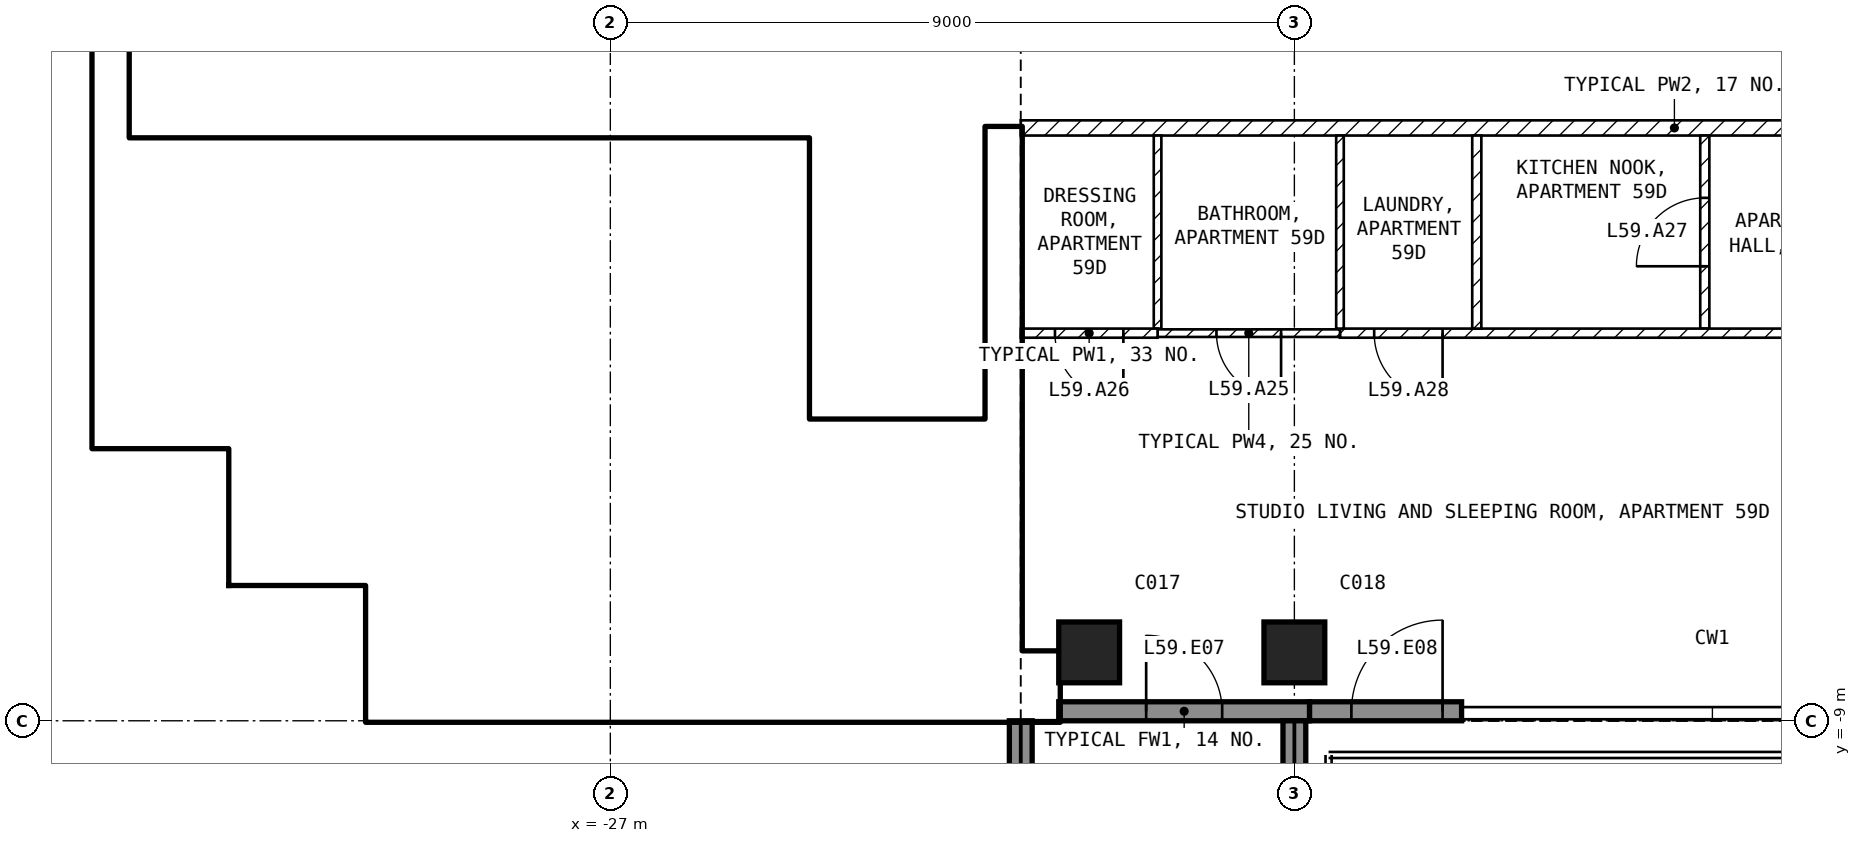
"""IFC4 building model, lengths in metres.
Left out: names, types, materials, properties, quantities, classifications, styles, units other than length and angle.
Written with IfcOpenShell. Run it as: python <this file> out.ifc"""

import sys

from ifc_helpers import new_model, si_unit, direction, frame, frame_2d, origin, origin_2d, place, context, subcontext, project, spatial, rectangle, extrude, element, fill, save


model = new_model("IFC4")
c1 = context("Model", 3, precision=1e-05, world=origin(), true_north=direction((0.0, 1.0)))
c2 = subcontext(c1, "Body", "Model", "MODEL_VIEW")
j1 = project(units=[si_unit("LENGTHUNIT", "METRE"), si_unit("PLANEANGLEUNIT", "RADIAN")], contexts=[c1])
p1 = place(None, origin())
s1 = spatial("IfcSite", under=j1, at=p1, CompositionType="ELEMENT")
p2 = place(p1, origin())
s2 = spatial("IfcBuilding", under=s1, at=p2, CompositionType="ELEMENT")
p3 = place(p2, frame((0.0, 0.0, 236.0)))
s3 = spatial("IfcBuildingStorey", under=s2, at=p3, CompositionType="ELEMENT", Elevation=236.0)
for number, where, z_axis, x_axis in (
    (1, (-20.7, -8.1, -0.25), (0.0, 0.0, 1.0), (1.0, 0.0, 0.0)),
    (2, (-18.0, -8.1, -0.25), (0.0, 0.0, 1.0), (1.0, 0.0, 0.0)),
):
    element("IfcColumn", number, at=place(p3, frame(where, z_axis=z_axis, x_axis=x_axis)), inside=s3, PredefinedType="COLUMN", context=c2, shape_type="SweptSolid", body=[
        extrude(rectangle(XDim=0.8, YDim=0.8, at=origin_2d()), origin(), (0.0, 0.0, 1.0), 3.5),
    ])
p4 = place(p3, frame((-21.1, -8.875, 0.0), z_axis=(0.0, 0.0, 1.0), x_axis=(1.0, 0.0, 0.0)))
e3 = element("IfcWall", 3, at=p4, inside=s3, PredefinedType="SOLIDWALL", context=c2, shape_type="SweptSolid", body=[
    extrude(rectangle(XDim=3.3, YDim=0.25, at=frame_2d((1.65, 0.0))), origin(), (0.0, 0.0, 1.0), 3.25),
])
p5 = place(p4, frame((1.15, 0.0, 0.0)))
e4 = element("IfcOpeningElement", 4, at=p5, cuts=e3, PredefinedType="OPENING", context=c2, shape_type="SweptSolid", body=[
    extrude(rectangle(XDim=1.0, YDim=2.4, at=frame_2d((0.5, 1.2))), frame((0.0, 0.135, 0.0), z_axis=(0.0, -1.0, 0.0), x_axis=(1.0, 0.0, 0.0)), (0.0, 0.0, 1.0), 0.27),
])
p6 = place(p3, frame((-17.8, -8.875, 0.0), z_axis=(0.0, 0.0, 1.0), x_axis=(1.0, 0.0, 0.0)))
e5 = element("IfcWall", 5, at=p6, inside=s3, PredefinedType="SOLIDWALL", context=c2, shape_type="SweptSolid", body=[
    extrude(rectangle(XDim=2.0, YDim=0.25, at=frame_2d((1.0, 0.0))), origin(), (0.0, 0.0, 1.0), 3.25),
])
p7 = place(p6, frame((0.55, 0.0, 0.0)))
e6 = element("IfcOpeningElement", 6, at=p7, cuts=e5, PredefinedType="OPENING", context=c2, shape_type="SweptSolid", body=[
    extrude(rectangle(XDim=1.2, YDim=2.4, at=frame_2d((0.6, 1.2))), frame((0.0, 0.135, 0.0), z_axis=(0.0, -1.0, 0.0), x_axis=(1.0, 0.0, 0.0)), (0.0, 0.0, 1.0), 0.27),
])
p8 = place(p3, frame((-21.6, -9.0, 0.0), z_axis=(0.0, 0.0, 1.0), x_axis=(0.0, -1.0, 0.0)))
e7 = element("IfcWall", 7, at=p8, inside=s3, PredefinedType="SOLIDWALL", context=c2, shape_type="SweptSolid", body=[
    extrude(rectangle(XDim=2.7, YDim=0.3, at=frame_2d((1.35, 0.0))), origin(), (0.0, 0.0, 1.0), 3.25),
])
p9 = place(p3, frame((-18.0, -9.0, 0.0), z_axis=(0.0, 0.0, 1.0), x_axis=(0.0, -1.0, 0.0)))
e8 = element("IfcWall", 8, at=p9, inside=s3, PredefinedType="SOLIDWALL", context=c2, shape_type="SweptSolid", body=[
    extrude(rectangle(XDim=2.74, YDim=0.3, at=frame_2d((1.37, 0.0))), origin(), (0.0, 0.0, 1.0), 3.25),
])
p10 = place(p3, frame((-30.2, -8.55, 0.0), z_axis=(0.0, 0.0, 1.0), x_axis=(1.0, 0.0, 0.0)))
e9 = element("IfcWall", 9, at=p10, inside=s3, PredefinedType="SHEAR", context=c2, shape_type="SweptSolid", body=[
    extrude(rectangle(XDim=9.1, YDim=0.9, at=frame_2d((4.55, 0.0))), origin(), (0.0, 0.0, 1.0), 3.25),
])
p11 = place(p3, frame((-29.975, -8.1, 0.0), z_axis=(0.0, 0.0, 1.0), x_axis=(0.0, 1.0, 0.0)))
e10 = element("IfcWall", 10, at=p11, inside=s3, PredefinedType="SHEAR", context=c2, shape_type="SweptSolid", body=[
    extrude(rectangle(XDim=1.35, YDim=0.45, at=frame_2d((0.675, 0.0))), origin(), (0.0, 0.0, 1.0), 3.25),
])
for number, where, z_axis, x_axis in (
    (11, (-32.0, -6.975, 0.0), (0.0, 0.0, 1.0), (1.0, 0.0, 0.0)),
    (12, (-31.775, -6.75, 0.0), (0.0, 0.0, 1.0), (0.0, 1.0, 0.0)),
    (13, (-33.8, -5.175, 0.0), (0.0, 0.0, 1.0), (1.0, 0.0, 0.0)),
):
    element("IfcWall", number, at=place(p3, frame(where, z_axis=z_axis, x_axis=x_axis)), inside=s3, PredefinedType="SHEAR", context=c2, shape_type="SweptSolid", body=[
        extrude(rectangle(XDim=1.8, YDim=0.45, at=frame_2d((0.9, 0.0))), origin(), (0.0, 0.0, 1.0), 3.25),
    ])
p12 = place(p3, frame((-33.575, -4.95, 0.0), z_axis=(0.0, 0.0, 1.0), x_axis=(0.0, 1.0, 0.0)))
e14 = element("IfcWall", 14, at=p12, inside=s3, PredefinedType="SHEAR", context=c2, shape_type="SweptSolid", body=[
    extrude(rectangle(XDim=10.35, YDim=0.45, at=frame_2d((5.175, 0.0))), origin(), (0.0, 0.0, 1.0), 3.25),
])
p13 = place(p3, frame((-21.825, -8.1, 0.0), z_axis=(0.0, 0.0, 1.0), x_axis=(0.0, 1.0, 0.0)))
e15 = element("IfcWall", 15, at=p13, inside=s3, PredefinedType="SHEAR", context=c2, shape_type="SweptSolid", body=[
    extrude(rectangle(XDim=6.9, YDim=0.45, at=frame_2d((3.45, 0.0))), origin(), (0.0, 0.0, 1.0), 3.25),
])
p14 = place(p3, frame((-24.5, -5.05, 0.0), z_axis=(0.0, 0.0, 1.0), x_axis=(0.0, 1.0, 0.0)))
e16 = element("IfcWall", 16, at=p14, inside=s3, PredefinedType="SOLIDWALL", context=c2, shape_type="SweptSolid", body=[
    extrude(rectangle(XDim=3.7, YDim=0.2, at=frame_2d((1.85, 0.0))), origin(), (0.0, 0.0, 1.0), 3.25),
])
p15 = place(p14, frame((0.1, 0.0, 0.0)))
e17 = element("IfcOpeningElement", 17, at=p15, cuts=e16, PredefinedType="OPENING", context=c2, shape_type="SweptSolid", body=[
    extrude(rectangle(XDim=0.8, YDim=2.1, at=frame_2d((0.4, 1.05))), frame((0.0, 0.11, 0.0), z_axis=(0.0, -1.0, 0.0), x_axis=(1.0, 0.0, 0.0)), (0.0, 0.0, 1.0), 0.22),
])
p16 = place(p3, frame((-28.35, -5.15, 0.0), z_axis=(0.0, 0.0, 1.0), x_axis=(1.0, 0.0, 0.0)))
e18 = element("IfcWall", 18, at=p16, inside=s3, PredefinedType="SOLIDWALL", context=c2, shape_type="SweptSolid", body=[
    extrude(rectangle(XDim=6.3, YDim=0.2, at=frame_2d((3.15, 0.0))), origin(), (0.0, 0.0, 1.0), 3.25),
])
p17 = place(p16, frame((5.1, 0.0, 0.0)))
e19 = element("IfcOpeningElement", 19, at=p17, cuts=e18, PredefinedType="OPENING", context=c2, shape_type="SweptSolid", body=[
    extrude(rectangle(XDim=1.0, YDim=2.1, at=frame_2d((0.5, 1.05))), frame((0.0, 0.11, 0.0), z_axis=(0.0, -1.0, 0.0), x_axis=(1.0, 0.0, 0.0)), (0.0, 0.0, 1.0), 0.22),
])
p18 = place(p3, frame((-28.25, -8.1, 0.0), z_axis=(0.0, 0.0, 1.0), x_axis=(0.0, 1.0, 0.0)))
e20 = element("IfcWall", 20, at=p18, inside=s3, PredefinedType="SOLIDWALL", context=c2, shape_type="SweptSolid", body=[
    extrude(rectangle(XDim=2.85, YDim=0.2, at=frame_2d((1.425, 0.0))), origin(), (0.0, 0.0, 1.0), 3.25),
])
p19 = place(p3, frame((-33.35, -1.45, 0.0), z_axis=(0.0, 0.0, 1.0), x_axis=(1.0, 0.0, 0.0)))
e21 = element("IfcWall", 21, at=p19, inside=s3, PredefinedType="SOLIDWALL", context=c2, shape_type="SweptSolid", body=[
    extrude(rectangle(XDim=8.75, YDim=0.2, at=frame_2d((4.375, 0.0))), origin(), (0.0, 0.0, 1.0), 3.25),
])
p20 = place(p19, frame((7.35, 0.0, 0.0)))
e22 = element("IfcOpeningElement", 22, at=p20, cuts=e21, PredefinedType="OPENING", context=c2, shape_type="SweptSolid", body=[
    extrude(rectangle(XDim=1.0, YDim=2.1, at=frame_2d((0.5, 1.05))), frame((0.0, 0.11, 0.0), z_axis=(0.0, -1.0, 0.0), x_axis=(1.0, 0.0, 0.0)), (0.0, 0.0, 1.0), 0.22),
])
p21 = place(p19, frame((5.35, 0.0, 0.0)))
e23 = element("IfcOpeningElement", 23, at=p21, cuts=e21, PredefinedType="OPENING", context=c2, shape_type="SweptSolid", body=[
    extrude(rectangle(XDim=1.0, YDim=2.1, at=frame_2d((0.5, 1.05))), frame((0.0, 0.11, 0.0), z_axis=(0.0, -1.0, 0.0), x_axis=(1.0, 0.0, 0.0)), (0.0, 0.0, 1.0), 0.22),
])
p22 = place(p19, frame((3.35, 0.0, 0.0)))
e24 = element("IfcOpeningElement", 24, at=p22, cuts=e21, PredefinedType="OPENING", context=c2, shape_type="SweptSolid", body=[
    extrude(rectangle(XDim=1.0, YDim=2.1, at=frame_2d((0.5, 1.05))), frame((0.0, 0.11, 0.0), z_axis=(0.0, -1.0, 0.0), x_axis=(1.0, 0.0, 0.0)), (0.0, 0.0, 1.0), 0.22),
])
p23 = place(p19, frame((0.925, 0.0, 0.0)))
e25 = element("IfcOpeningElement", 25, at=p23, cuts=e21, PredefinedType="OPENING", context=c2, shape_type="SweptSolid", body=[
    extrude(rectangle(XDim=0.9, YDim=2.1, at=frame_2d((0.45, 1.05))), frame((0.0, 0.11, 0.0), z_axis=(0.0, -1.0, 0.0), x_axis=(1.0, 0.0, 0.0)), (0.0, 0.0, 1.0), 0.22),
])
p24 = place(p3, frame((-33.35, -3.95, 0.0), z_axis=(0.0, 0.0, 1.0), x_axis=(1.0, 0.0, 0.0)))
e26 = element("IfcWall", 26, at=p24, inside=s3, PredefinedType="SOLIDWALL", context=c2, shape_type="SweptSolid", body=[
    extrude(rectangle(XDim=8.75, YDim=0.2, at=frame_2d((4.375, 0.0))), origin(), (0.0, 0.0, 1.0), 3.25),
])
for number, where, z_axis, x_axis in (
    (27, (-26.5, -3.85, 0.0), (0.0, 0.0, 1.0), (0.0, 1.0, 0.0)),
    (28, (-28.5, -3.85, 0.0), (0.0, 0.0, 1.0), (0.0, 1.0, 0.0)),
    (29, (-30.5, -3.85, 0.0), (0.0, 0.0, 1.0), (0.0, 1.0, 0.0)),
):
    element("IfcWall", number, at=place(p3, frame(where, z_axis=z_axis, x_axis=x_axis)), inside=s3, PredefinedType="SOLIDWALL", context=c2, shape_type="SweptSolid", body=[
        extrude(rectangle(XDim=2.3, YDim=0.2, at=frame_2d((1.15, 0.0))), origin(), (0.0, 0.0, 1.0), 3.25),
    ])
p25 = place(p3, frame((-27.4, -5.05, 0.0), z_axis=(0.0, 0.0, 1.0), x_axis=(0.0, 1.0, 0.0)))
e30 = element("IfcWall", 30, at=p25, inside=s3, PredefinedType="PARTITIONING", context=c2, shape_type="SweptSolid", body=[
    extrude(rectangle(XDim=1.0, YDim=0.15, at=frame_2d((0.5, 0.0))), origin(), (0.0, 0.0, 1.0), 3.25),
])
p26 = place(p25, frame((0.1, 0.0, 0.0)))
e31 = element("IfcOpeningElement", 31, at=p26, cuts=e30, PredefinedType="OPENING", context=c2, shape_type="SweptSolid", body=[
    extrude(rectangle(XDim=0.8, YDim=2.1, at=frame_2d((0.4, 1.05))), frame((0.0, 0.085, 0.0), z_axis=(0.0, -1.0, 0.0), x_axis=(1.0, 0.0, 0.0)), (0.0, 0.0, 1.0), 0.17),
])
p27 = place(p3, frame((-4.4, -1.2, 0.0), z_axis=(0.0, 0.0, 1.0), x_axis=(-1.0, 0.0, 0.0)))
e32 = element("IfcWall", 32, at=p27, inside=s3, PredefinedType="PARTITIONING", context=c2, shape_type="SweptSolid", body=[
    extrude(rectangle(XDim=17.2, YDim=0.2, at=frame_2d((8.6, 0.0))), origin(), (0.0, 0.0, 1.0), 3.25),
])
p28 = place(p27, frame((5.9, 0.0, 0.0)))
e33 = element("IfcOpeningElement", 33, at=p28, cuts=e32, PredefinedType="OPENING", context=c2, shape_type="SweptSolid", body=[
    extrude(rectangle(XDim=1.0, YDim=2.1, at=frame_2d((0.5, 1.05))), frame((0.0, 0.11, 0.0), z_axis=(0.0, -1.0, 0.0), x_axis=(1.0, 0.0, 0.0)), (0.0, 0.0, 1.0), 0.22),
])
p29 = place(p3, frame((-12.6, -3.84, 0.0), z_axis=(0.0, 0.0, 1.0), x_axis=(0.0, 1.0, 0.0)))
e34 = element("IfcWall", 34, at=p29, inside=s3, PredefinedType="PARTITIONING", context=c2, shape_type="SweptSolid", body=[
    extrude(rectangle(XDim=2.54, YDim=0.12, at=frame_2d((1.27, 0.0))), origin(), (0.0, 0.0, 1.0), 3.25),
])
p30 = place(p29, frame((0.82, 0.0, 0.0)))
e35 = element("IfcOpeningElement", 35, at=p30, cuts=e34, PredefinedType="OPENING", context=c2, shape_type="SweptSolid", body=[
    extrude(rectangle(XDim=0.9, YDim=2.1, at=frame_2d((0.45, 1.05))), frame((0.0, 0.07, 0.0), z_axis=(0.0, -1.0, 0.0), x_axis=(1.0, 0.0, 0.0)), (0.0, 0.0, 1.0), 0.14),
])
p31 = place(p3, frame((-8.94, -3.9, 0.0), z_axis=(0.0, 0.0, 1.0), x_axis=(-1.0, 0.0, 0.0)))
e36 = element("IfcWall", 36, at=p31, inside=s3, PredefinedType="PARTITIONING", context=c2, shape_type="SweptSolid", body=[
    extrude(rectangle(XDim=8.46, YDim=0.12, at=frame_2d((4.23, 0.0))), origin(), (0.0, 0.0, 1.0), 3.25),
])
p32 = place(p31, frame((7.11, 0.0, 0.0)))
e37 = element("IfcOpeningElement", 37, at=p32, cuts=e36, PredefinedType="OPENING", context=c2, shape_type="SweptSolid", body=[
    extrude(rectangle(XDim=0.9, YDim=2.1, at=frame_2d((0.45, 1.05))), frame((0.0, 0.07, 0.0), z_axis=(0.0, -1.0, 0.0), x_axis=(1.0, 0.0, 0.0)), (0.0, 0.0, 1.0), 0.14),
])
p33 = place(p31, frame((1.41, 0.0, 0.0)))
e38 = element("IfcOpeningElement", 38, at=p33, cuts=e36, PredefinedType="OPENING", context=c2, shape_type="SweptSolid", body=[
    extrude(rectangle(XDim=0.9, YDim=2.1, at=frame_2d((0.45, 1.05))), frame((0.0, 0.07, 0.0), z_axis=(0.0, -1.0, 0.0), x_axis=(1.0, 0.0, 0.0)), (0.0, 0.0, 1.0), 0.14),
])
p34 = place(p3, frame((-15.6, -3.84, 0.0), z_axis=(0.0, 0.0, 1.0), x_axis=(0.0, 1.0, 0.0)))
e39 = element("IfcWall", 39, at=p34, inside=s3, PredefinedType="PARTITIONING", context=c2, shape_type="SweptSolid", body=[
    extrude(rectangle(XDim=2.54, YDim=0.12, at=frame_2d((1.27, 0.0))), origin(), (0.0, 0.0, 1.0), 3.25),
])
for number, where, z_axis, x_axis in (
    (40, (-17.4, -3.84, 0.0), (0.0, 0.0, 1.0), (0.0, 1.0, 0.0)),
    (41, (-19.8, -3.84, 0.0), (0.0, 0.0, 1.0), (0.0, 1.0, 0.0)),
):
    element("IfcWall", number, at=place(p3, frame(where, z_axis=z_axis, x_axis=x_axis)), inside=s3, PredefinedType="PARTITIONING", context=c2, shape_type="SweptSolid", body=[
        extrude(rectangle(XDim=2.54, YDim=0.1, at=frame_2d((1.27, 0.0))), origin(), (0.0, 0.0, 1.0), 3.25),
    ])
p35 = place(p3, frame((-17.4, -3.9, 0.0), z_axis=(0.0, 0.0, 1.0), x_axis=(-1.0, 0.0, 0.0)))
e42 = element("IfcWall", 42, at=p35, inside=s3, PredefinedType="PARTITIONING", context=c2, shape_type="SweptSolid", body=[
    extrude(rectangle(XDim=2.4, YDim=0.1, at=frame_2d((1.2, 0.0))), origin(), (0.0, 0.0, 1.0), 3.25),
])
p36 = place(p35, frame((0.775, 0.0, 0.0)))
e43 = element("IfcOpeningElement", 43, at=p36, cuts=e42, PredefinedType="OPENING", context=c2, shape_type="SweptSolid", body=[
    extrude(rectangle(XDim=0.85, YDim=2.1, at=frame_2d((0.425, 1.05))), frame((0.0, 0.06, 0.0), z_axis=(0.0, -1.0, 0.0), x_axis=(1.0, 0.0, 0.0)), (0.0, 0.0, 1.0), 0.12),
])
p37 = place(p3, frame((-19.8, -3.9, 0.0), z_axis=(0.0, 0.0, 1.0), x_axis=(-1.0, 0.0, 0.0)))
e44 = element("IfcWall", 44, at=p37, inside=s3, PredefinedType="PARTITIONING", context=c2, shape_type="SweptSolid", body=[
    extrude(rectangle(XDim=1.8, YDim=0.12, at=frame_2d((0.9, 0.0))), origin(), (0.0, 0.0, 1.0), 3.25),
])
p38 = place(p37, frame((0.45, 0.0, 0.0)))
e45 = element("IfcOpeningElement", 45, at=p38, cuts=e44, PredefinedType="OPENING", context=c2, shape_type="SweptSolid", body=[
    extrude(rectangle(XDim=0.9, YDim=2.1, at=frame_2d((0.45, 1.05))), frame((0.0, 0.07, 0.0), z_axis=(0.0, -1.0, 0.0), x_axis=(1.0, 0.0, 0.0)), (0.0, 0.0, 1.0), 0.14),
])
p39 = place(p5, origin())
e46 = element("IfcDoor", 46, at=p39, inside=s3, OperationType="SINGLE_SWING_LEFT", PredefinedType="DOOR", context=c2, shape_type="SweptSolid", body=[
    extrude(rectangle(XDim=1.0, YDim=2.4, at=frame_2d((0.5, 1.2))), frame((0.0, 0.025, 0.0), z_axis=(0.0, -1.0, 0.0), x_axis=(1.0, 0.0, 0.0)), (0.0, 0.0, 1.0), 0.05),
])
fill(e4, e46)
p40 = place(p7, origin())
e47 = element("IfcDoor", 47, at=p40, inside=s3, OperationType="SINGLE_SWING_RIGHT", PredefinedType="DOOR", context=c2, shape_type="SweptSolid", body=[
    extrude(rectangle(XDim=1.2, YDim=2.4, at=frame_2d((0.6, 1.2))), frame((0.0, 0.025, 0.0), z_axis=(0.0, -1.0, 0.0), x_axis=(1.0, 0.0, 0.0)), (0.0, 0.0, 1.0), 0.05),
])
fill(e6, e47)
p41 = place(p20, origin())
e48 = element("IfcDoor", 48, at=p41, inside=s3, OperationType="DOUBLE_DOOR_SLIDING", PredefinedType="DOOR", context=c2, shape_type="SweptSolid", body=[
    extrude(rectangle(XDim=1.0, YDim=2.1, at=frame_2d((0.5, 1.05))), frame((0.0, 0.025, 0.0), z_axis=(0.0, -1.0, 0.0), x_axis=(1.0, 0.0, 0.0)), (0.0, 0.0, 1.0), 0.05),
])
fill(e22, e48)
p42 = place(p21, origin())
e49 = element("IfcDoor", 49, at=p42, inside=s3, OperationType="DOUBLE_DOOR_SLIDING", PredefinedType="DOOR", context=c2, shape_type="SweptSolid", body=[
    extrude(rectangle(XDim=1.0, YDim=2.1, at=frame_2d((0.5, 1.05))), frame((0.0, 0.025, 0.0), z_axis=(0.0, -1.0, 0.0), x_axis=(1.0, 0.0, 0.0)), (0.0, 0.0, 1.0), 0.05),
])
fill(e23, e49)
p43 = place(p22, origin())
e50 = element("IfcDoor", 50, at=p43, inside=s3, OperationType="DOUBLE_DOOR_SLIDING", PredefinedType="DOOR", context=c2, shape_type="SweptSolid", body=[
    extrude(rectangle(XDim=1.0, YDim=2.1, at=frame_2d((0.5, 1.05))), frame((0.0, 0.025, 0.0), z_axis=(0.0, -1.0, 0.0), x_axis=(1.0, 0.0, 0.0)), (0.0, 0.0, 1.0), 0.05),
])
fill(e24, e50)
p44 = place(p17, origin())
e51 = element("IfcDoor", 51, at=p44, inside=s3, OperationType="SINGLE_SWING_LEFT", PredefinedType="DOOR", context=c2, shape_type="SweptSolid", body=[
    extrude(rectangle(XDim=1.0, YDim=2.1, at=frame_2d((0.5, 1.05))), frame((0.0, 0.025, 0.0), z_axis=(0.0, -1.0, 0.0), x_axis=(1.0, 0.0, 0.0)), (0.0, 0.0, 1.0), 0.05),
])
fill(e19, e51)
p45 = place(p15, origin())
e52 = element("IfcDoor", 52, at=p45, inside=s3, OperationType="SINGLE_SWING_LEFT", PredefinedType="DOOR", context=c2, shape_type="SweptSolid", body=[
    extrude(rectangle(XDim=0.8, YDim=2.1, at=frame_2d((0.4, 1.05))), frame((0.0, 0.025, 0.0), z_axis=(0.0, -1.0, 0.0), x_axis=(1.0, 0.0, 0.0)), (0.0, 0.0, 1.0), 0.05),
])
fill(e17, e52)
p46 = place(p26, origin())
e53 = element("IfcDoor", 53, at=p46, inside=s3, OperationType="SINGLE_SWING_LEFT", PredefinedType="DOOR", context=c2, shape_type="SweptSolid", body=[
    extrude(rectangle(XDim=0.8, YDim=2.1, at=frame_2d((0.4, 1.05))), frame((0.0, 0.025, 0.0), z_axis=(0.0, -1.0, 0.0), x_axis=(1.0, 0.0, 0.0)), (0.0, 0.0, 1.0), 0.05),
])
fill(e31, e53)
p47 = place(p23, origin())
e54 = element("IfcDoor", 54, at=p47, inside=s3, OperationType="SINGLE_SWING_LEFT", PredefinedType="DOOR", context=c2, shape_type="SweptSolid", body=[
    extrude(rectangle(XDim=0.9, YDim=2.1, at=frame_2d((0.45, 1.05))), frame((0.0, 0.025, 0.0), z_axis=(0.0, -1.0, 0.0), x_axis=(1.0, 0.0, 0.0)), (0.0, 0.0, 1.0), 0.05),
])
fill(e25, e54)
p48 = place(p36, origin())
e55 = element("IfcDoor", 55, at=p48, inside=s3, OperationType="SINGLE_SWING_LEFT", PredefinedType="DOOR", context=c2, shape_type="SweptSolid", body=[
    extrude(rectangle(XDim=0.85, YDim=2.1, at=frame_2d((0.425, 1.05))), frame((0.0, 0.025, 0.0), z_axis=(0.0, -1.0, 0.0), x_axis=(1.0, 0.0, 0.0)), (0.0, 0.0, 1.0), 0.05),
])
fill(e43, e55)
p49 = place(p38, origin())
e56 = element("IfcDoor", 56, at=p49, inside=s3, OperationType="SINGLE_SWING_LEFT", PredefinedType="DOOR", context=c2, shape_type="SweptSolid", body=[
    extrude(rectangle(XDim=0.9, YDim=2.1, at=frame_2d((0.45, 1.05))), frame((0.0, 0.025, 0.0), z_axis=(0.0, -1.0, 0.0), x_axis=(1.0, 0.0, 0.0)), (0.0, 0.0, 1.0), 0.05),
])
fill(e45, e56)
p50 = place(p30, origin())
e57 = element("IfcDoor", 57, at=p50, inside=s3, OperationType="SINGLE_SWING_LEFT", PredefinedType="DOOR", context=c2, shape_type="SweptSolid", body=[
    extrude(rectangle(XDim=0.9, YDim=2.1, at=frame_2d((0.45, 1.05))), frame((0.0, 0.025, 0.0), z_axis=(0.0, -1.0, 0.0), x_axis=(1.0, 0.0, 0.0)), (0.0, 0.0, 1.0), 0.05),
])
fill(e35, e57)
p51 = place(p32, origin())
e58 = element("IfcDoor", 58, at=p51, inside=s3, OperationType="SINGLE_SWING_LEFT", PredefinedType="DOOR", context=c2, shape_type="SweptSolid", body=[
    extrude(rectangle(XDim=0.9, YDim=2.1, at=frame_2d((0.45, 1.05))), frame((0.0, 0.025, 0.0), z_axis=(0.0, -1.0, 0.0), x_axis=(1.0, 0.0, 0.0)), (0.0, 0.0, 1.0), 0.05),
])
fill(e37, e58)
save(model, sys.argv[1])
